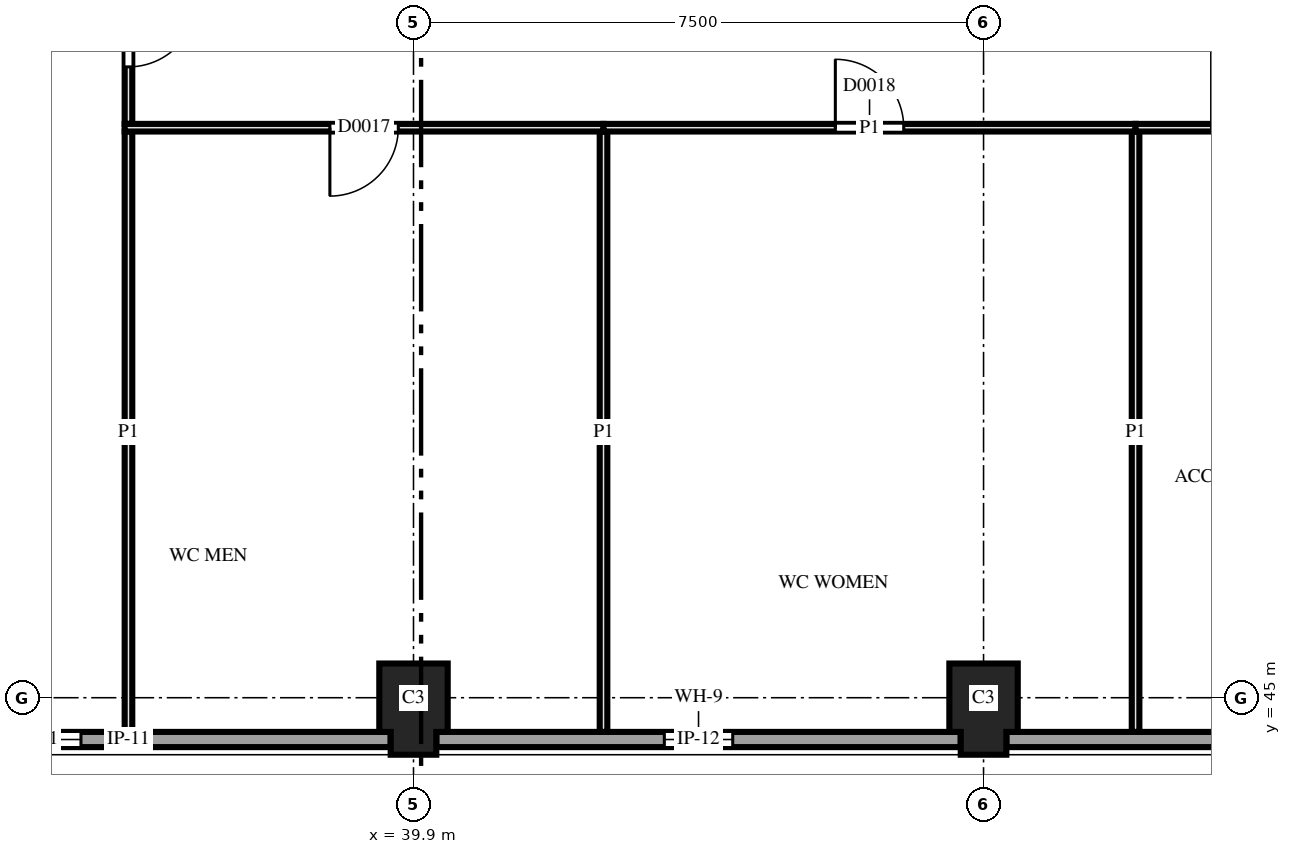
"""IFC4 building model, lengths in metres.
Left out: names, types, materials, properties, quantities, classifications, styles, units other than length and angle.
Written with IfcOpenShell. Run it as: python <this file> out.ifc"""

import sys

from ifc_helpers import new_model, si_unit, direction, frame, frame_2d, origin, place, context, subcontext, project, spatial, polyline, rectangle, outline, extrude, element, fill, save


model = new_model("IFC4")
c1 = context("Model", 3, precision=1e-05, world=origin(), true_north=direction((0.0, 1.0)))
c2 = subcontext(c1, "Body", "Model", "MODEL_VIEW")
j1 = project(units=[si_unit("LENGTHUNIT", "METRE"), si_unit("PLANEANGLEUNIT", "RADIAN")], contexts=[c1])
p1 = place(None, origin())
s1 = spatial("IfcSite", under=j1, at=p1, CompositionType="ELEMENT")
p2 = place(p1, origin())
s2 = spatial("IfcBuilding", under=s1, at=p2, CompositionType="ELEMENT")
p3 = place(p2, origin())
s3 = spatial("IfcBuildingStorey", under=s2, at=p3, CompositionType="ELEMENT", Elevation=0.0)
for number, where, z_axis, x_axis in (
    (1, (39.9, 45.0, 0.0), (0.0, 0.0, 1.0), (0.0, -1.0, 0.0)),
    (2, (47.4, 45.0, 0.0), (0.0, 0.0, 1.0), (0.0, -1.0, 0.0)),
):
    element("IfcColumn", number, at=place(p3, frame(where, z_axis=z_axis, x_axis=x_axis)), inside=s3, PredefinedType="COLUMN", context=c2, shape_type="SweptSolid", body=[
        extrude(outline(polyline([(-0.45, -0.45), (0.45, -0.45), (0.45, -0.3), (0.75, -0.3), (0.75, 0.3), (0.45, 0.3), (0.45, 0.45), (-0.45, 0.45), (-0.45, -0.45)])), origin(), (0.0, 0.0, 1.0), 4.5),
    ])
p4 = place(p3, frame((32.7, 44.45, 0.0), z_axis=(0.0, 0.0, 1.0), x_axis=(1.0, 0.0, 0.0)))
e3 = element("IfcWall", 3, at=p4, inside=s3, PredefinedType="SOLIDWALL", context=c2, shape_type="SweptSolid", body=[
    extrude(outline(polyline([(0.0, 0.0), (6.9, 0.0), (6.9, 3.1), (6.002, 3.1), (6.0, 2.4), (5.681, 2.56), (5.363, 2.695), (5.044, 2.806), (4.725, 2.895), (4.406, 2.963), (4.087, 3.012), (3.769, 3.041), (3.45, 3.05), (3.131, 3.041), (2.812, 3.012), (2.494, 2.963), (2.175, 2.895), (1.856, 2.806), (1.538, 2.695), (1.219, 2.56), (0.9, 2.4), (0.898, 3.1), (0.0, 3.1), (0.0, 0.0)])), frame((0.0, 0.1, 0.0), z_axis=(0.0, -1.0, 0.0), x_axis=(1.0, 0.0, 0.0)), (0.0, 0.0, 1.0), 0.2),
])
p5 = place(p4, frame((1.625, 0.0, 0.6)))
e4 = element("IfcOpeningElement", 4, at=p5, cuts=e3, PredefinedType="OPENING", context=c2, shape_type="SweptSolid", body=[
    extrude(rectangle(XDim=1.2, YDim=1.2, at=frame_2d((0.6, 0.6))), frame((0.0, 0.11, 0.0), z_axis=(0.0, -1.0, 0.0), x_axis=(1.0, 0.0, 0.0)), (0.0, 0.0, 1.0), 0.22),
])
p6 = place(p3, frame((40.2, 44.45, 0.0), z_axis=(0.0, 0.0, 1.0), x_axis=(1.0, 0.0, 0.0)))
e5 = element("IfcWall", 5, at=p6, inside=s3, PredefinedType="SOLIDWALL", context=c2, shape_type="SweptSolid", body=[
    extrude(outline(polyline([(0.0, 0.0), (6.9, 0.0), (6.9, 3.1), (6.002, 3.1), (6.0, 2.4), (5.681, 2.56), (5.363, 2.695), (5.044, 2.806), (4.725, 2.895), (4.406, 2.963), (4.087, 3.012), (3.769, 3.041), (3.45, 3.05), (3.131, 3.041), (2.812, 3.012), (2.494, 2.963), (2.175, 2.895), (1.856, 2.806), (1.538, 2.695), (1.219, 2.56), (0.9, 2.4), (0.898, 3.1), (0.0, 3.1), (0.0, 0.0)])), frame((0.0, 0.1, 0.0), z_axis=(0.0, -1.0, 0.0), x_axis=(1.0, 0.0, 0.0)), (0.0, 0.0, 1.0), 0.2),
])
p7 = place(p6, frame((3.0, 0.0, 2.4)))
e6 = element("IfcOpeningElement", 6, at=p7, cuts=e5, PredefinedType="OPENING", context=c2, shape_type="SweptSolid", body=[
    extrude(rectangle(XDim=0.9, YDim=0.531, at=frame_2d((0.45, 0.266))), frame((0.0, 0.11, 0.0), z_axis=(0.0, -1.0, 0.0), x_axis=(1.0, 0.0, 0.0)), (0.0, 0.0, 1.0), 0.22),
])
p8 = place(p3, frame((47.7, 44.45, 0.0), z_axis=(0.0, 0.0, 1.0), x_axis=(1.0, 0.0, 0.0)))
e7 = element("IfcWall", 7, at=p8, inside=s3, PredefinedType="SOLIDWALL", context=c2, shape_type="SweptSolid", body=[
    extrude(outline(polyline([(0.0, 0.0), (6.9, 0.0), (6.9, 3.1), (6.002, 3.1), (6.0, 2.4), (5.681, 2.56), (5.363, 2.695), (5.044, 2.806), (4.725, 2.895), (4.406, 2.963), (4.087, 3.012), (3.769, 3.041), (3.45, 3.05), (3.131, 3.041), (2.812, 3.012), (2.494, 2.963), (2.175, 2.895), (1.856, 2.806), (1.538, 2.695), (1.219, 2.56), (0.9, 2.4), (0.898, 3.1), (0.0, 3.1), (0.0, 0.0)])), frame((0.0, 0.1, 0.0), z_axis=(0.0, -1.0, 0.0), x_axis=(1.0, 0.0, 0.0)), (0.0, 0.0, 1.0), 0.2),
])
p9 = place(p8, frame((3.0, 0.0, 2.4)))
e8 = element("IfcOpeningElement", 8, at=p9, cuts=e7, PredefinedType="OPENING", context=c2, shape_type="SweptSolid", body=[
    extrude(rectangle(XDim=0.9, YDim=0.531, at=frame_2d((0.45, 0.266))), frame((0.0, 0.11, 0.0), z_axis=(0.0, -1.0, 0.0), x_axis=(1.0, 0.0, 0.0)), (0.0, 0.0, 1.0), 0.22),
])
for number, where, z_axis, x_axis in (
    (9, (36.15, 44.55, 0.0), (0.0, 0.0, 1.0), (0.0, 1.0, 0.0)),
    (10, (42.4, 44.55, 0.0), (0.0, 0.0, 1.0), (0.0, 1.0, 0.0)),
    (11, (49.4, 44.55, 0.0), (0.0, 0.0, 1.0), (0.0, 1.0, 0.0)),
):
    element("IfcWall", number, at=place(p3, frame(where, z_axis=z_axis, x_axis=x_axis)), inside=s3, PredefinedType="PARTITIONING", context=c2, shape_type="SweptSolid", body=[
        extrude(rectangle(XDim=7.9, YDim=0.1, at=frame_2d((3.95, 0.0))), origin(), (0.0, 0.0, 1.0), 3.68),
    ])
p10 = place(p3, frame((36.15, 52.55, 0.0), z_axis=(0.0, 0.0, 1.0), x_axis=(0.0, 1.0, 0.0)))
e12 = element("IfcWall", 12, at=p10, inside=s3, PredefinedType="PARTITIONING", context=c2, shape_type="SweptSolid", body=[
    extrude(rectangle(XDim=2.4, YDim=0.1, at=frame_2d((1.2, 0.0))), origin(), (0.0, 0.0, 1.0), 3.68),
])
p11 = place(p10, frame((0.75, 0.0, 0.0)))
e13 = element("IfcOpeningElement", 13, at=p11, cuts=e12, PredefinedType="OPENING", context=c2, shape_type="SweptSolid", body=[
    extrude(rectangle(XDim=0.9, YDim=2.1, at=frame_2d((0.45, 1.05))), frame((0.0, 0.06, 0.0), z_axis=(0.0, -1.0, 0.0), x_axis=(1.0, 0.0, 0.0)), (0.0, 0.0, 1.0), 0.12),
])
p12 = place(p3, frame((42.4, 52.5, 0.0), z_axis=(0.0, 0.0, 1.0), x_axis=(-1.0, 0.0, 0.0)))
e14 = element("IfcWall", 14, at=p12, inside=s3, PredefinedType="PARTITIONING", context=c2, shape_type="SweptSolid", body=[
    extrude(rectangle(XDim=6.3, YDim=0.1, at=frame_2d((3.15, 0.0))), origin(), (0.0, 0.0, 1.0), 3.68),
])
p13 = place(p12, frame((2.7, 0.0, 0.0)))
e15 = element("IfcOpeningElement", 15, at=p13, cuts=e14, PredefinedType="OPENING", context=c2, shape_type="SweptSolid", body=[
    extrude(rectangle(XDim=0.9, YDim=2.1, at=frame_2d((0.45, 1.05))), frame((0.0, 0.06, 0.0), z_axis=(0.0, -1.0, 0.0), x_axis=(1.0, 0.0, 0.0)), (0.0, 0.0, 1.0), 0.12),
])
p14 = place(p3, frame((49.4, 52.5, 0.0), z_axis=(0.0, 0.0, 1.0), x_axis=(-1.0, 0.0, 0.0)))
e16 = element("IfcWall", 16, at=p14, inside=s3, PredefinedType="PARTITIONING", context=c2, shape_type="SweptSolid", body=[
    extrude(rectangle(XDim=7.0, YDim=0.1, at=frame_2d((3.5, 0.0))), origin(), (0.0, 0.0, 1.0), 3.68),
])
p15 = place(p14, frame((3.05, 0.0, 0.0)))
e17 = element("IfcOpeningElement", 17, at=p15, cuts=e16, PredefinedType="OPENING", context=c2, shape_type="SweptSolid", body=[
    extrude(rectangle(XDim=0.9, YDim=2.1, at=frame_2d((0.45, 1.05))), frame((0.0, 0.06, 0.0), z_axis=(0.0, -1.0, 0.0), x_axis=(1.0, 0.0, 0.0)), (0.0, 0.0, 1.0), 0.12),
])
p16 = place(p3, frame((52.4, 52.5, 0.0), z_axis=(0.0, 0.0, 1.0), x_axis=(-1.0, 0.0, 0.0)))
e18 = element("IfcWall", 18, at=p16, inside=s3, PredefinedType="PARTITIONING", context=c2, shape_type="SweptSolid", body=[
    extrude(rectangle(XDim=3.0, YDim=0.1, at=frame_2d((1.5, 0.0))), origin(), (0.0, 0.0, 1.0), 3.68),
])
p17 = place(p16, frame((1.0, 0.0, 0.0)))
e19 = element("IfcOpeningElement", 19, at=p17, cuts=e18, PredefinedType="OPENING", context=c2, shape_type="SweptSolid", body=[
    extrude(rectangle(XDim=1.0, YDim=2.1, at=frame_2d((0.5, 1.05))), frame((0.0, 0.06, 0.0), z_axis=(0.0, -1.0, 0.0), x_axis=(1.0, 0.0, 0.0)), (0.0, 0.0, 1.0), 0.12),
])
p18 = place(p5, origin())
e20 = element("IfcWindow", 20, at=p18, inside=s3, PartitioningType="SINGLE_PANEL", PredefinedType="WINDOW", context=c2, shape_type="SweptSolid", body=[
    extrude(rectangle(XDim=1.2, YDim=1.2, at=frame_2d((0.6, 0.6))), frame((0.0, 0.03, 0.0), z_axis=(0.0, -1.0, 0.0), x_axis=(1.0, 0.0, 0.0)), (0.0, 0.0, 1.0), 0.06),
])
fill(e4, e20)
p19 = place(p7, origin())
e21 = element("IfcWindow", 21, at=p19, inside=s3, PartitioningType="SINGLE_PANEL", PredefinedType="WINDOW", context=c2, shape_type="SweptSolid", body=[
    extrude(rectangle(XDim=0.9, YDim=0.531, at=frame_2d((0.45, 0.266))), frame((0.0, 0.03, 0.0), z_axis=(0.0, -1.0, 0.0), x_axis=(1.0, 0.0, 0.0)), (0.0, 0.0, 1.0), 0.06),
])
fill(e6, e21)
p20 = place(p11, origin())
e22 = element("IfcDoor", 22, at=p20, inside=s3, OperationType="SINGLE_SWING_RIGHT", PredefinedType="DOOR", context=c2, shape_type="SweptSolid", body=[
    extrude(rectangle(XDim=0.9, YDim=2.1, at=frame_2d((0.45, 1.05))), frame((0.0, 0.025, 0.0), z_axis=(0.0, -1.0, 0.0), x_axis=(1.0, 0.0, 0.0)), (0.0, 0.0, 1.0), 0.05),
])
fill(e13, e22)
p21 = place(p13, origin())
e23 = element("IfcDoor", 23, at=p21, inside=s3, OperationType="SINGLE_SWING_LEFT", PredefinedType="DOOR", context=c2, shape_type="SweptSolid", body=[
    extrude(rectangle(XDim=0.9, YDim=2.1, at=frame_2d((0.45, 1.05))), frame((0.0, 0.025, 0.0), z_axis=(0.0, -1.0, 0.0), x_axis=(1.0, 0.0, 0.0)), (0.0, 0.0, 1.0), 0.05),
])
fill(e15, e23)
p22 = place(p15, origin())
e24 = element("IfcDoor", 24, at=p22, inside=s3, OperationType="SINGLE_SWING_RIGHT", PredefinedType="DOOR", context=c2, shape_type="SweptSolid", body=[
    extrude(rectangle(XDim=0.9, YDim=2.1, at=frame_2d((0.45, 1.05))), frame((0.0, 0.025, 0.0), z_axis=(0.0, -1.0, 0.0), x_axis=(1.0, 0.0, 0.0)), (0.0, 0.0, 1.0), 0.05),
])
fill(e17, e24)
save(model, sys.argv[1])
